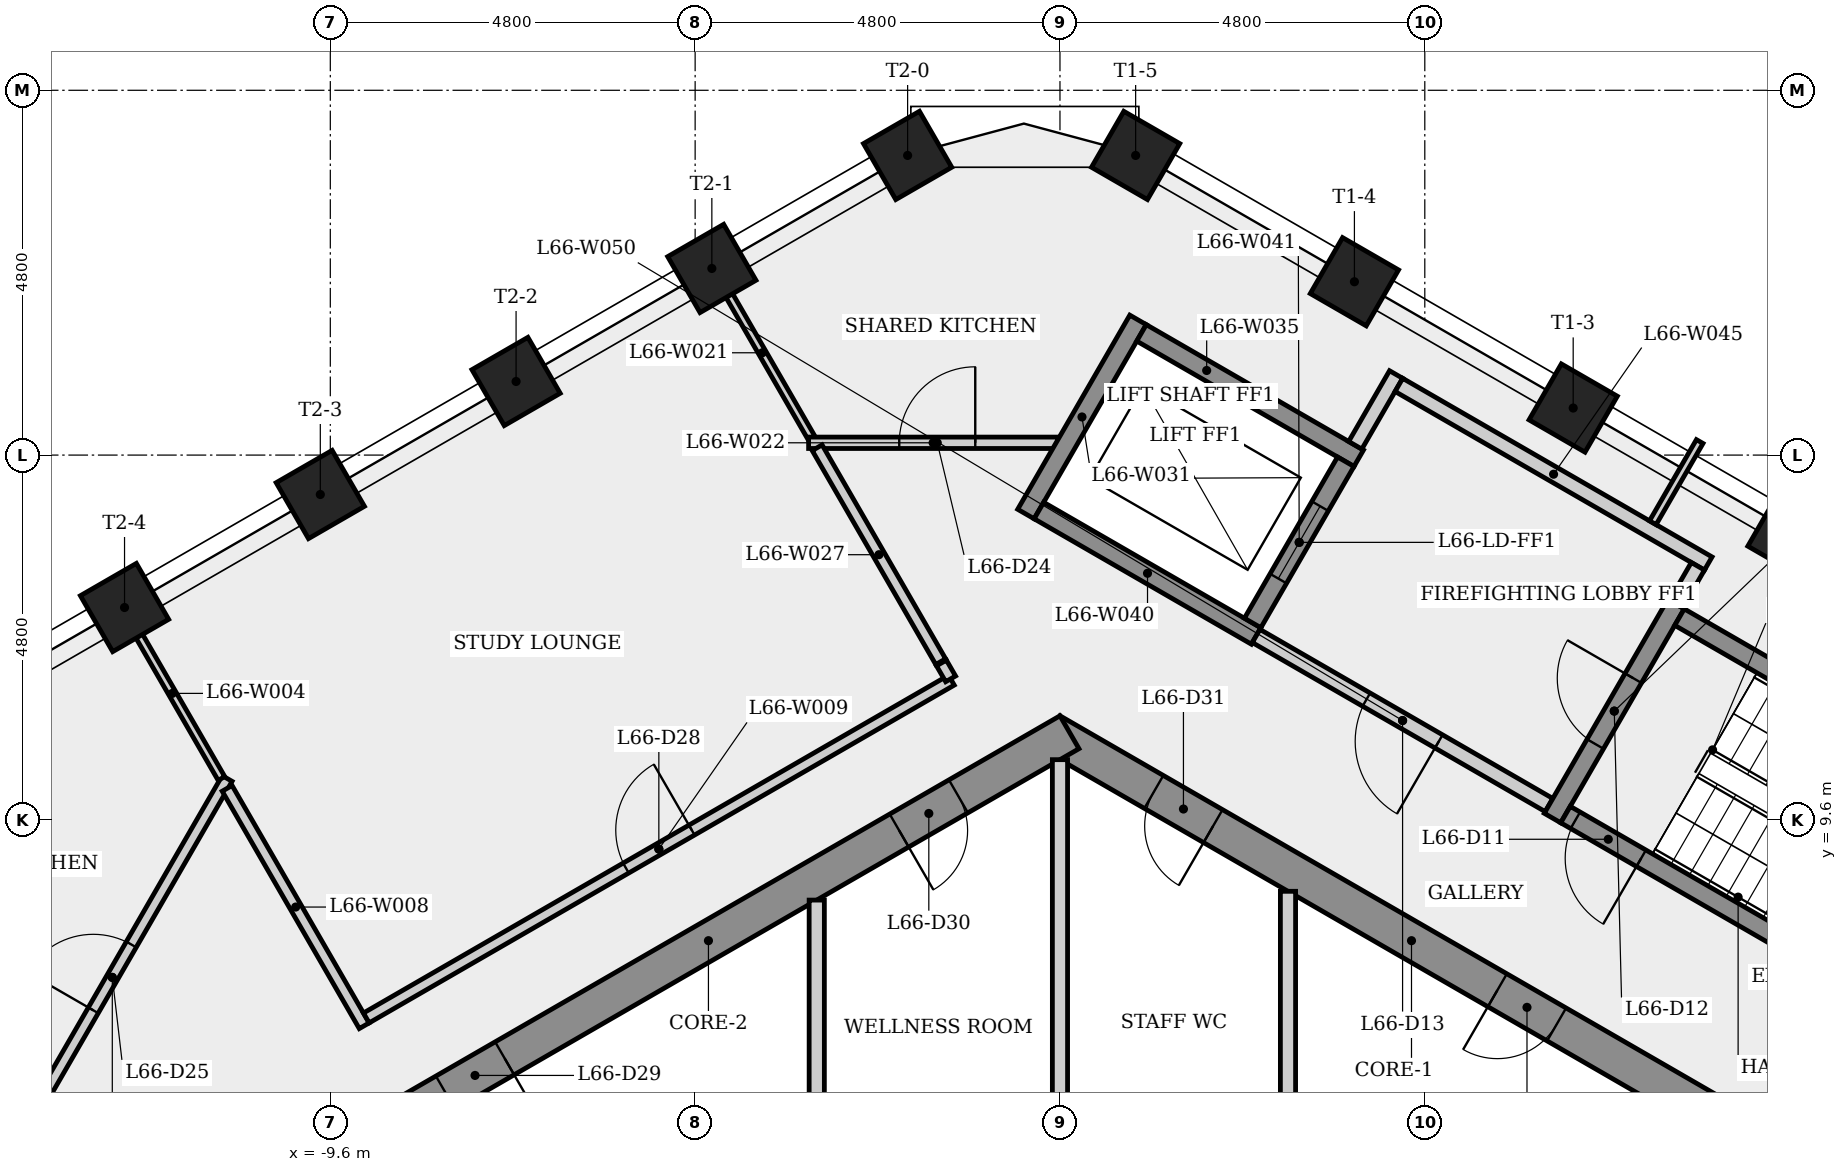
"""IFC4 building model, lengths in metres.
Left out: names, types, materials, properties, quantities, classifications, styles, units other than length and angle.
Written with IfcOpenShell. Run it as: python <this file> out.ifc"""

import sys

from ifc_helpers import new_model, si_unit, direction, frame, frame_2d, origin, origin_2d, place, context, subcontext, project, spatial, rectangle, extrude, element, fill, save


model = new_model("IFC4")
c1 = context("Model", 3, precision=1e-05, world=origin(), true_north=direction((0.0, 1.0)))
c2 = subcontext(c1, "Body", "Model", "MODEL_VIEW")
j1 = project(units=[si_unit("LENGTHUNIT", "METRE"), si_unit("PLANEANGLEUNIT", "RADIAN")], contexts=[c1])
p1 = place(None, origin())
s1 = spatial("IfcSite", under=j1, at=p1, CompositionType="ELEMENT")
p2 = place(p1, origin())
s2 = spatial("IfcBuilding", under=s1, at=p2, CompositionType="ELEMENT")
p3 = place(p2, frame((0.0, 0.0, 246.1)))
s3 = spatial("IfcBuildingStorey", under=s2, at=p3, CompositionType="ELEMENT", Elevation=246.1)
p4 = place(p3, frame((9.375, 5.268, 0.0), z_axis=(0.0, 0.0, 1.0), x_axis=(-0.866023993627, 0.500002442456, 0.0)))
e1 = element("IfcWall", 1, at=p4, inside=s3, PredefinedType="SHEAR", context=c2, shape_type="SweptSolid", body=[
    extrude(rectangle(XDim=10.97, YDim=0.5, at=frame_2d((5.485, 0.0))), origin(), (0.0, 0.0, 1.0), 3.4),
])
p5 = place(p4, frame((8.5, 0.0, 0.0)))
e2 = element("IfcOpeningElement", 2, at=p5, cuts=e1, PredefinedType="OPENING", context=c2, shape_type="SweptSolid", body=[
    extrude(rectangle(XDim=0.9, YDim=2.1, at=frame_2d((0.45, 1.05))), frame((0.0, 0.26, 0.0), z_axis=(0.0, -1.0, 0.0), x_axis=(1.0, 0.0, 0.0)), (0.0, 0.0, 1.0), 0.52),
])
p6 = place(p4, frame((3.28, 0.0, 0.0)))
e3 = element("IfcOpeningElement", 3, at=p6, cuts=e1, PredefinedType="OPENING", context=c2, shape_type="SweptSolid", body=[
    extrude(rectangle(XDim=0.9, YDim=2.1, at=frame_2d((0.45, 1.05))), frame((0.0, 0.26, 0.0), z_axis=(0.0, -1.0, 0.0), x_axis=(1.0, 0.0, 0.0)), (0.0, 0.0, 1.0), 0.52),
])
p7 = place(p3, frame((0.125, 10.753, 0.0), z_axis=(0.0, 0.0, 1.0), x_axis=(-0.866023993627, -0.500002442456, 0.0)))
e4 = element("IfcWall", 4, at=p7, inside=s3, PredefinedType="SHEAR", context=c2, shape_type="SweptSolid", body=[
    extrude(rectangle(XDim=10.97, YDim=0.5, at=frame_2d((5.485, 0.0))), origin(), (0.0, 0.0, 1.0), 3.4),
])
p8 = place(p7, frame((8.581, 0.0, 0.0)))
e5 = element("IfcOpeningElement", 5, at=p8, cuts=e4, PredefinedType="OPENING", context=c2, shape_type="SweptSolid", body=[
    extrude(rectangle(XDim=0.9, YDim=2.1, at=frame_2d((0.45, 1.05))), frame((0.0, 0.26, 0.0), z_axis=(0.0, -1.0, 0.0), x_axis=(1.0, 0.0, 0.0)), (0.0, 0.0, 1.0), 0.52),
])
p9 = place(p7, frame((1.687, 0.0, 0.0)))
e6 = element("IfcOpeningElement", 6, at=p9, cuts=e4, PredefinedType="OPENING", context=c2, shape_type="SweptSolid", body=[
    extrude(rectangle(XDim=0.9, YDim=2.1, at=frame_2d((0.45, 1.05))), frame((0.0, 0.26, 0.0), z_axis=(0.0, -1.0, 0.0), x_axis=(1.0, 0.0, 0.0)), (0.0, 0.0, 1.0), 0.52),
])
for number, where, z_axis, x_axis in (
    (7, (9.631, 13.357, 0.0), (0.0, 0.0, 1.0), (0.5, 0.866, 0.0)),
    (8, (6.752, 15.019, 0.0), (0.0, 0.0, 1.0), (0.5, 0.866, 0.0)),
    (9, (3.874, 16.681, 0.0), (0.0, 0.0, 1.0), (0.5, 0.866, 0.0)),
    (10, (0.996, 18.343, 0.0), (0.0, 0.0, 1.0), (0.5, 0.866, 0.0)),
    (11, (-2.004, 18.343, 0.0), (0.0, 0.0, 1.0), (-0.5, 0.866, 0.0)),
    (12, (-4.58, 16.856, 0.0), (0.0, 0.0, 1.0), (-0.5, 0.866, 0.0)),
    (13, (-7.156, 15.369, 0.0), (0.0, 0.0, 1.0), (-0.5, 0.866, 0.0)),
    (14, (-9.732, 13.881, 0.0), (0.0, 0.0, 1.0), (-0.5, 0.866, 0.0)),
    (15, (-12.307, 12.394, 0.0), (0.0, 0.0, 1.0), (-0.5, 0.866, 0.0)),
):
    element("IfcColumn", number, at=place(p3, frame(where, z_axis=z_axis, x_axis=x_axis)), inside=s3, PredefinedType="COLUMN", context=c2, shape_type="SweptSolid", body=[
        extrude(rectangle(XDim=0.85, YDim=0.85, at=origin_2d()), origin(), (0.0, 0.0, 1.0), 3.4),
    ])
p10 = place(p3, frame((-13.979, 4.91, 0.0), z_axis=(0.0, 0.0, 1.0), x_axis=(0.500000995992, 0.866024828747, 0.0)))
e16 = element("IfcWall", 16, at=p10, inside=s3, PredefinedType="PARTITIONING", context=c2, shape_type="SweptSolid", body=[
    extrude(rectangle(XDim=6.044, YDim=0.15, at=frame_2d((3.022, 0.0))), origin(), (0.0, 0.0, 1.0), 3.05),
])
p11 = place(p10, frame((2.522, 0.0, 0.0)))
e17 = element("IfcOpeningElement", 17, at=p11, cuts=e16, PredefinedType="OPENING", context=c2, shape_type="SweptSolid", body=[
    extrude(rectangle(XDim=1.0, YDim=2.1, at=frame_2d((0.5, 1.05))), frame((0.0, 0.085, 0.0), z_axis=(0.0, -1.0, 0.0), x_axis=(1.0, 0.0, 0.0)), (0.0, 0.0, 1.0), 0.17),
])
p12 = place(p3, frame((-12.325, 12.384, 0.0), z_axis=(0.0, 0.0, 1.0), x_axis=(0.500079363871, -0.865979578183, 0.0)))
e18 = element("IfcWall", 18, at=p12, inside=s3, PredefinedType="PARTITIONING", context=c2, shape_type="SweptSolid", body=[
    extrude(rectangle(XDim=2.585, YDim=0.1, at=frame_2d((1.293, 0.0))), origin(), (0.0, 0.0, 1.0), 3.05),
])
p13 = place(p3, frame((-10.957, 10.015, 0.0), z_axis=(0.0, 0.0, 1.0), x_axis=(0.500019324569, -0.866014246452, 0.0)))
e19 = element("IfcWall", 19, at=p13, inside=s3, PredefinedType="PARTITIONING", context=c2, shape_type="SweptSolid", body=[
    extrude(rectangle(XDim=3.607, YDim=0.15, at=frame_2d((1.803, 0.0))), origin(), (0.0, 0.0, 1.0), 3.05),
])
p14 = place(p3, frame((-9.126, 6.994, 0.0), z_axis=(0.0, 0.0, 1.0), x_axis=(0.866030533695, 0.499991114629, 0.0)))
e20 = element("IfcWall", 20, at=p14, inside=s3, PredefinedType="PARTITIONING", context=c2, shape_type="SweptSolid", body=[
    extrude(rectangle(XDim=8.889, YDim=0.15, at=frame_2d((4.444, 0.0))), origin(), (0.0, 0.0, 1.0), 3.05),
])
p15 = place(p14, frame((3.944, 0.0, 0.0)))
e21 = element("IfcOpeningElement", 21, at=p15, cuts=e20, PredefinedType="OPENING", context=c2, shape_type="SweptSolid", body=[
    extrude(rectangle(XDim=1.0, YDim=2.1, at=frame_2d((0.5, 1.05))), frame((0.0, 0.085, 0.0), z_axis=(0.0, -1.0, 0.0), x_axis=(1.0, 0.0, 0.0)), (0.0, 0.0, 1.0), 0.17),
])
p16 = place(p3, frame((-3.27, 14.627, 0.0), z_axis=(0.0, 0.0, 1.0), x_axis=(-0.500038474733, 0.866003189247, 0.0)))
e22 = element("IfcWall", 22, at=p16, inside=s3, PredefinedType="PARTITIONING", context=c2, shape_type="SweptSolid", body=[
    extrude(rectangle(XDim=2.586, YDim=0.1, at=frame_2d((1.293, 0.0))), origin(), (0.0, 0.0, 1.0), 3.05),
])
p17 = place(p3, frame((-3.307, 14.562, 0.0), z_axis=(0.0, 0.0, 1.0), x_axis=(1.0, 0.0, 0.0)))
e23 = element("IfcWall", 23, at=p17, inside=s3, PredefinedType="PARTITIONING", context=c2, shape_type="SweptSolid", body=[
    extrude(rectangle(XDim=3.276, YDim=0.15, at=frame_2d((1.638, 0.0))), origin(), (0.0, 0.0, 1.0), 3.05),
])
p18 = place(p17, frame((1.193, 0.0, 0.0)))
e24 = element("IfcOpeningElement", 24, at=p18, cuts=e23, PredefinedType="OPENING", context=c2, shape_type="SweptSolid", body=[
    extrude(rectangle(XDim=1.0, YDim=2.1, at=frame_2d((0.5, 1.05))), frame((0.0, 0.085, 0.0), z_axis=(0.0, -1.0, 0.0), x_axis=(1.0, 0.0, 0.0)), (0.0, 0.0, 1.0), 0.17),
])
p19 = place(p3, frame((-3.2, 8.545, 0.0), z_axis=(0.0, 0.0, 1.0), x_axis=(0.0, -1.0, 0.0)))
e25 = element("IfcWall", 25, at=p19, inside=s3, PredefinedType="PARTITIONING", context=c2, shape_type="SweptSolid", body=[
    extrude(rectangle(XDim=3.27, YDim=0.2, at=frame_2d((1.635, 0.0))), origin(), (0.0, 0.0, 1.0), 3.05),
])
p20 = place(p3, frame((-1.569, 11.682, 0.0), z_axis=(0.0, 0.0, 1.0), x_axis=(-0.500008528526, 0.866020479782, 0.0)))
e26 = element("IfcWall", 26, at=p20, inside=s3, PredefinedType="PARTITIONING", context=c2, shape_type="SweptSolid", body=[
    extrude(rectangle(XDim=3.25, YDim=0.15, at=frame_2d((1.625, 0.0))), origin(), (0.0, 0.0, 1.0), 3.05),
])
p21 = place(p3, frame((-1.559, 11.665, 0.0), z_axis=(0.0, 0.0, 1.0), x_axis=(0.499401523306, -0.866370658852, 0.0)))
e27 = element("IfcWall", 27, at=p21, inside=s3, PredefinedType="PARTITIONING", context=c2, shape_type="SweptSolid", body=[
    extrude(rectangle(XDim=0.241, YDim=0.15, at=frame_2d((0.121, 0.0))), origin(), (0.0, 0.0, 1.0), 3.05),
])
p22 = place(p3, frame((-0.448, 13.624, 0.0), z_axis=(0.0, 0.0, 1.0), x_axis=(0.500037662692, 0.866003658127, 0.0)))
e28 = element("IfcWall", 28, at=p22, inside=s3, PredefinedType="SHEAR", context=c2, shape_type="SweptSolid", body=[
    extrude(rectangle(XDim=2.95, YDim=0.25, at=frame_2d((1.475, 0.0))), origin(), (0.0, 0.0, 1.0), 3.05),
])
p23 = place(p3, frame((0.0, 10.392, 0.0), z_axis=(0.0, 0.0, 1.0), x_axis=(0.0, -1.0, 0.0)))
e29 = element("IfcWall", 29, at=p23, inside=s3, PredefinedType="PARTITIONING", context=c2, shape_type="SweptSolid", body=[
    extrude(rectangle(XDim=5.117, YDim=0.2, at=frame_2d((2.559, 0.0))), origin(), (0.0, 0.0, 1.0), 3.05),
])
for number, where, z_axis, x_axis in (
    (30, (1.073, 16.008, 0.0), (0.0, 0.0, 1.0), (0.866, -0.5, 0.0)),
    (31, (2.581, 12.02, 0.0), (0.0, 0.0, 1.0), (-0.866, 0.5, 0.0)),
):
    element("IfcWall", number, at=place(p3, frame(where, z_axis=z_axis, x_axis=x_axis)), inside=s3, PredefinedType="SHEAR", context=c2, shape_type="SweptSolid", body=[
        extrude(rectangle(XDim=3.3, YDim=0.25, at=frame_2d((1.65, 0.0))), origin(), (0.0, 0.0, 1.0), 3.05),
    ])
p24 = place(p3, frame((2.535, 12.191, 0.0), z_axis=(0.0, 0.0, 1.0), x_axis=(0.500061746146, 0.865989751695, 0.0)))
e32 = element("IfcWall", 32, at=p24, inside=s3, PredefinedType="SHEAR", context=c2, shape_type="SweptSolid", body=[
    extrude(rectangle(XDim=2.45, YDim=0.25, at=frame_2d((1.225, 0.0))), origin(), (0.0, 0.0, 1.0), 3.4),
])
p25 = place(p24, frame((0.675, 0.0, 0.0)))
e33 = element("IfcOpeningElement", 33, at=p25, cuts=e32, PredefinedType="OPENING", context=c2, shape_type="SweptSolid", body=[
    extrude(rectangle(XDim=1.1, YDim=2.1, at=frame_2d((0.55, 1.05))), frame((0.0, 0.135, 0.0), z_axis=(0.0, -1.0, 0.0), x_axis=(1.0, 0.0, 0.0)), (0.0, 0.0, 1.0), 0.27),
])
p26 = place(p3, frame((3.0, 8.66, 0.0), z_axis=(0.0, 0.0, 1.0), x_axis=(0.0, -1.0, 0.0)))
e34 = element("IfcWall", 34, at=p26, inside=s3, PredefinedType="PARTITIONING", context=c2, shape_type="SweptSolid", body=[
    extrude(rectangle(XDim=3.385, YDim=0.2, at=frame_2d((1.693, 0.0))), origin(), (0.0, 0.0, 1.0), 3.05),
])
p27 = place(p3, frame((3.885, 14.529, 0.0), z_axis=(0.0, 0.0, 1.0), x_axis=(0.499997628298, 0.866026773083, 0.0)))
e35 = element("IfcWall", 35, at=p27, inside=s3, PredefinedType="PARTITIONING", context=c2, shape_type="SweptSolid", body=[
    extrude(rectangle(XDim=1.075, YDim=0.2, at=frame_2d((0.538, 0.0))), origin(), (0.0, 0.0, 1.0), 3.05),
])
p28 = place(p3, frame((4.459, 15.323, 0.0), z_axis=(0.0, 0.0, 1.0), x_axis=(0.866016039709, -0.500016218704, 0.0)))
e36 = element("IfcWall", 36, at=p28, inside=s3, PredefinedType="PARTITIONING", context=c2, shape_type="SweptSolid", body=[
    extrude(rectangle(XDim=4.7, YDim=0.2, at=frame_2d((2.35, 0.0))), origin(), (0.0, 0.0, 1.0), 3.05),
])
p29 = place(p3, frame((6.435, 9.795, 0.0), z_axis=(0.0, 0.0, 1.0), x_axis=(-0.866012907634, 0.500021643343, 0.0)))
e37 = element("IfcWall", 37, at=p29, inside=s3, PredefinedType="PARTITIONING", context=c2, shape_type="SweptSolid", body=[
    extrude(rectangle(XDim=4.45, YDim=0.2, at=frame_2d((2.225, 0.0))), origin(), (0.0, 0.0, 1.0), 3.05),
])
p30 = place(p29, frame((1.675, 0.0, 0.0)))
e38 = element("IfcOpeningElement", 38, at=p30, cuts=e37, PredefinedType="OPENING", context=c2, shape_type="SweptSolid", body=[
    extrude(rectangle(XDim=1.1, YDim=2.1, at=frame_2d((0.55, 1.05))), frame((0.0, 0.11, 0.0), z_axis=(0.0, -1.0, 0.0), x_axis=(1.0, 0.0, 0.0)), (0.0, 0.0, 1.0), 0.22),
])
p31 = place(p3, frame((6.48, 9.624, 0.0), z_axis=(0.0, 0.0, 1.0), x_axis=(0.500017246033, 0.866015446554, 0.0)))
e39 = element("IfcWall", 39, at=p31, inside=s3, PredefinedType="SHEAR", context=c2, shape_type="SweptSolid", body=[
    extrude(rectangle(XDim=3.25, YDim=0.25, at=frame_2d((1.625, 0.0))), origin(), (0.0, 0.0, 1.0), 3.05),
])
p32 = place(p31, frame((1.125, 0.0, 0.0)))
e40 = element("IfcOpeningElement", 40, at=p32, cuts=e39, PredefinedType="OPENING", context=c2, shape_type="SweptSolid", body=[
    extrude(rectangle(XDim=1.0, YDim=2.1, at=frame_2d((0.5, 1.05))), frame((0.0, 0.135, 0.0), z_axis=(0.0, -1.0, 0.0), x_axis=(1.0, 0.0, 0.0)), (0.0, 0.0, 1.0), 0.27),
])
p33 = place(p3, frame((7.8, 13.51, 0.0), z_axis=(0.0, 0.0, 1.0), x_axis=(0.500076467306, 0.865981250863, 0.0)))
e41 = element("IfcWall", 41, at=p33, inside=s3, PredefinedType="PARTITIONING", context=c2, shape_type="SweptSolid", body=[
    extrude(rectangle(XDim=1.234, YDim=0.1, at=frame_2d((0.617, 0.0))), origin(), (0.0, 0.0, 1.0), 3.05),
])
p34 = place(p3, frame((8.151, 12.268, 0.0), z_axis=(0.0, 0.0, 1.0), x_axis=(0.866025499775, -0.499999833739, 0.0)))
e42 = element("IfcWall", 42, at=p34, inside=s3, PredefinedType="SHEAR", context=c2, shape_type="SweptSolid", body=[
    extrude(rectangle(XDim=6.4, YDim=0.25, at=frame_2d((3.2, 0.0))), origin(), (0.0, 0.0, 1.0), 3.05),
])
p35 = place(p3, frame((8.393, 12.937, 0.0), z_axis=(0.0, 0.0, 1.0), x_axis=(-0.500065409566, -0.86598763626, 0.0)))
e43 = element("IfcWall", 43, at=p35, inside=s3, PredefinedType="PARTITIONING", context=c2, shape_type="SweptSolid", body=[
    extrude(rectangle(XDim=0.575, YDim=0.2, at=frame_2d((0.288, 0.0))), origin(), (0.0, 0.0, 1.0), 3.05),
])
p36 = place(p3, frame((12.194, 6.47, 0.0), z_axis=(0.0, 0.0, 1.0), x_axis=(-0.866025499775, 0.499999833739, 0.0)))
e44 = element("IfcWall", 44, at=p36, inside=s3, PredefinedType="SHEAR", context=c2, shape_type="SweptSolid", body=[
    extrude(rectangle(XDim=6.4, YDim=0.25, at=frame_2d((3.2, 0.0))), origin(), (0.0, 0.0, 1.0), 3.05),
])
p37 = place(p36, frame((5.25, 0.0, 0.0)))
e45 = element("IfcOpeningElement", 45, at=p37, cuts=e44, PredefinedType="OPENING", context=c2, shape_type="SweptSolid", body=[
    extrude(rectangle(XDim=1.0, YDim=2.1, at=frame_2d((0.5, 1.05))), frame((0.0, 0.135, 0.0), z_axis=(0.0, -1.0, 0.0), x_axis=(1.0, 0.0, 0.0)), (0.0, 0.0, 1.0), 0.27),
])
p38 = place(p37, origin())
e46 = element("IfcDoor", 46, at=p38, inside=s3, OperationType="SINGLE_SWING_LEFT", PredefinedType="DOOR", context=c2, shape_type="SweptSolid", body=[
    extrude(rectangle(XDim=1.0, YDim=2.1, at=frame_2d((0.5, 1.05))), frame((0.0, 0.025, 0.0), z_axis=(0.0, -1.0, 0.0), x_axis=(1.0, 0.0, 0.0)), (0.0, 0.0, 1.0), 0.05),
])
fill(e45, e46)
p39 = place(p32, origin())
e47 = element("IfcDoor", 47, at=p39, inside=s3, OperationType="SINGLE_SWING_RIGHT", PredefinedType="DOOR", context=c2, shape_type="SweptSolid", body=[
    extrude(rectangle(XDim=1.0, YDim=2.1, at=frame_2d((0.5, 1.05))), frame((0.0, 0.025, 0.0), z_axis=(0.0, -1.0, 0.0), x_axis=(1.0, 0.0, 0.0)), (0.0, 0.0, 1.0), 0.05),
])
fill(e40, e47)
p40 = place(p30, origin())
e48 = element("IfcDoor", 48, at=p40, inside=s3, OperationType="SINGLE_SWING_LEFT", PredefinedType="DOOR", context=c2, shape_type="SweptSolid", body=[
    extrude(rectangle(XDim=1.1, YDim=2.1, at=frame_2d((0.55, 1.05))), frame((0.0, 0.025, 0.0), z_axis=(0.0, -1.0, 0.0), x_axis=(1.0, 0.0, 0.0)), (0.0, 0.0, 1.0), 0.05),
])
fill(e38, e48)
p41 = place(p25, origin())
e49 = element("IfcDoor", 49, at=p41, inside=s3, OperationType="SLIDING_TO_LEFT", PredefinedType="DOOR", context=c2, shape_type="SweptSolid", body=[
    extrude(rectangle(XDim=1.1, YDim=2.1, at=frame_2d((0.55, 1.05))), frame((0.0, 0.025, 0.0), z_axis=(0.0, -1.0, 0.0), x_axis=(1.0, 0.0, 0.0)), (0.0, 0.0, 1.0), 0.05),
])
fill(e33, e49)
p42 = place(p18, origin())
e50 = element("IfcDoor", 50, at=p42, inside=s3, OperationType="SINGLE_SWING_RIGHT", PredefinedType="DOOR", context=c2, shape_type="SweptSolid", body=[
    extrude(rectangle(XDim=1.0, YDim=2.1, at=frame_2d((0.5, 1.05))), frame((0.0, 0.025, 0.0), z_axis=(0.0, -1.0, 0.0), x_axis=(1.0, 0.0, 0.0)), (0.0, 0.0, 1.0), 0.05),
])
fill(e24, e50)
p43 = place(p11, origin())
e51 = element("IfcDoor", 51, at=p43, inside=s3, OperationType="SINGLE_SWING_LEFT", PredefinedType="DOOR", context=c2, shape_type="SweptSolid", body=[
    extrude(rectangle(XDim=1.0, YDim=2.1, at=frame_2d((0.5, 1.05))), frame((0.0, 0.025, 0.0), z_axis=(0.0, -1.0, 0.0), x_axis=(1.0, 0.0, 0.0)), (0.0, 0.0, 1.0), 0.05),
])
fill(e17, e51)
p44 = place(p15, origin())
e52 = element("IfcDoor", 52, at=p44, inside=s3, OperationType="SINGLE_SWING_RIGHT", PredefinedType="DOOR", context=c2, shape_type="SweptSolid", body=[
    extrude(rectangle(XDim=1.0, YDim=2.1, at=frame_2d((0.5, 1.05))), frame((0.0, 0.025, 0.0), z_axis=(0.0, -1.0, 0.0), x_axis=(1.0, 0.0, 0.0)), (0.0, 0.0, 1.0), 0.05),
])
fill(e21, e52)
p45 = place(p8, origin())
e53 = element("IfcDoor", 53, at=p45, inside=s3, OperationType="SINGLE_SWING_LEFT", PredefinedType="DOOR", context=c2, shape_type="SweptSolid", body=[
    extrude(rectangle(XDim=0.9, YDim=2.1, at=frame_2d((0.45, 1.05))), frame((0.0, 0.025, 0.0), z_axis=(0.0, -1.0, 0.0), x_axis=(1.0, 0.0, 0.0)), (0.0, 0.0, 1.0), 0.05),
])
fill(e5, e53)
p46 = place(p9, origin())
e54 = element("IfcDoor", 54, at=p46, inside=s3, OperationType="SINGLE_SWING_RIGHT", PredefinedType="DOOR", context=c2, shape_type="SweptSolid", body=[
    extrude(rectangle(XDim=0.9, YDim=2.1, at=frame_2d((0.45, 1.05))), frame((0.0, 0.025, 0.0), z_axis=(0.0, -1.0, 0.0), x_axis=(1.0, 0.0, 0.0)), (0.0, 0.0, 1.0), 0.05),
])
fill(e6, e54)
p47 = place(p5, origin())
e55 = element("IfcDoor", 55, at=p47, inside=s3, OperationType="SINGLE_SWING_LEFT", PredefinedType="DOOR", context=c2, shape_type="SweptSolid", body=[
    extrude(rectangle(XDim=0.9, YDim=2.1, at=frame_2d((0.45, 1.05))), frame((0.0, 0.025, 0.0), z_axis=(0.0, -1.0, 0.0), x_axis=(1.0, 0.0, 0.0)), (0.0, 0.0, 1.0), 0.05),
])
fill(e2, e55)
p48 = place(p6, origin())
e56 = element("IfcDoor", 56, at=p48, inside=s3, OperationType="SINGLE_SWING_RIGHT", PredefinedType="DOOR", context=c2, shape_type="SweptSolid", body=[
    extrude(rectangle(XDim=0.9, YDim=2.1, at=frame_2d((0.45, 1.05))), frame((0.0, 0.025, 0.0), z_axis=(0.0, -1.0, 0.0), x_axis=(1.0, 0.0, 0.0)), (0.0, 0.0, 1.0), 0.05),
])
fill(e3, e56)
save(model, sys.argv[1])
